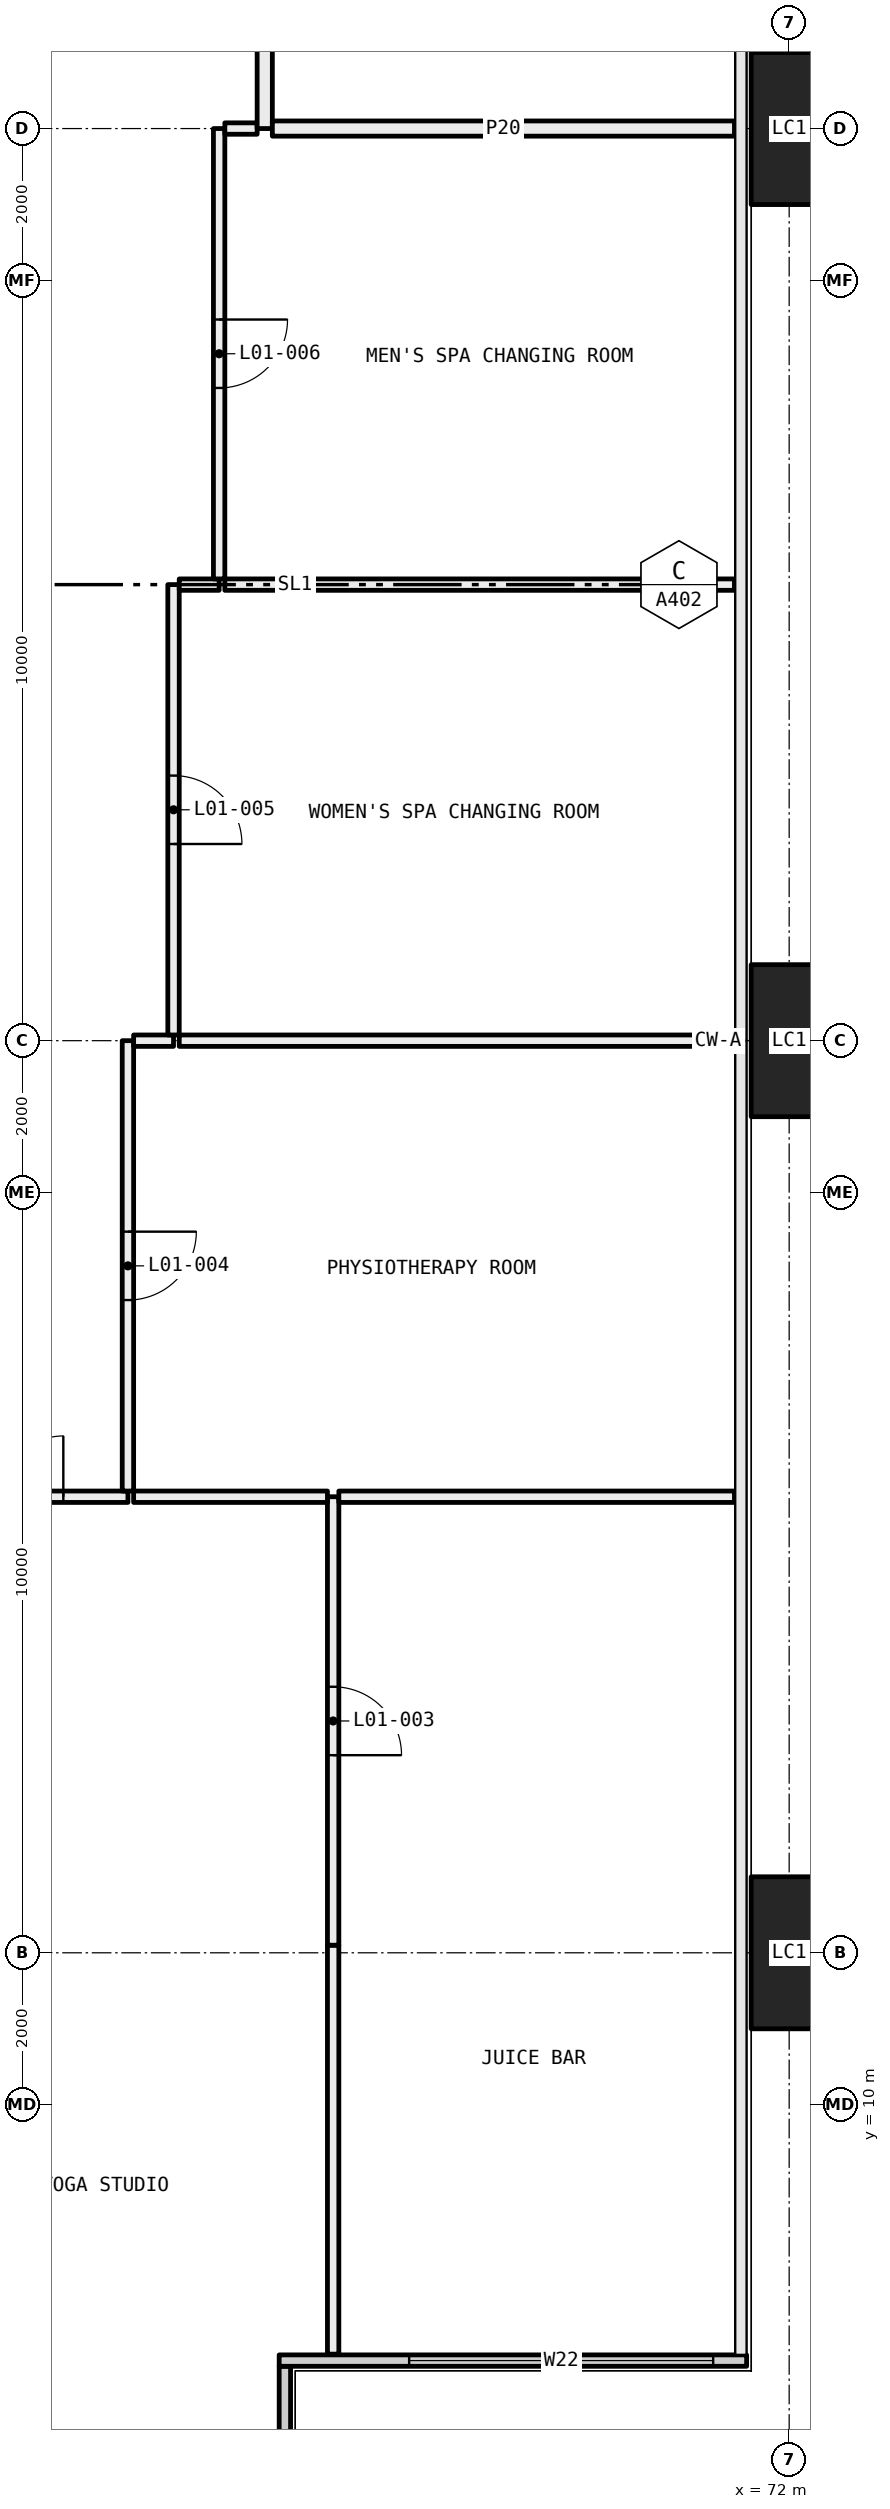
"""IFC4 building model, lengths in metres.
Left out: names, types, materials, properties, quantities, classifications, styles, units other than length and angle.
Written with IfcOpenShell. Run it as: python <this file> out.ifc"""

import sys

from ifc_helpers import new_model, si_unit, direction, frame, frame_2d, origin, origin_2d, place, context, subcontext, project, spatial, rectangle, hollow_rectangle, extrude, element, fill, save


model = new_model("IFC4")
c1 = context("Model", 3, precision=1e-05, world=origin(), true_north=direction((0.0, 1.0)))
c2 = subcontext(c1, "Body", "Model", "MODEL_VIEW")
j1 = project(units=[si_unit("LENGTHUNIT", "METRE"), si_unit("PLANEANGLEUNIT", "RADIAN")], contexts=[c1])
p1 = place(None, origin())
s1 = spatial("IfcSite", under=j1, at=p1, CompositionType="ELEMENT")
p2 = place(p1, origin())
s2 = spatial("IfcBuilding", under=s1, at=p2, CompositionType="ELEMENT")
p3 = place(p2, frame((0.0, 0.0, 6.0)))
s3 = spatial("IfcBuildingStorey", under=s2, at=p3, CompositionType="ELEMENT", Elevation=6.0)
for number, where, z_axis, x_axis in (
    (1, (72.0, 12.0, -0.4), (0.0, 0.0, 1.0), (0.0, 1.0, 0.0)),
    (2, (72.0, 24.0, -0.4), (0.0, 0.0, 1.0), (0.0, 1.0, 0.0)),
    (3, (72.0, 36.0, -0.4), (0.0, 0.0, 1.0), (0.0, 1.0, 0.0)),
):
    element("IfcColumn", number, at=place(p3, frame(where, z_axis=z_axis, x_axis=x_axis)), inside=s3, PredefinedType="COLUMN", context=c2, shape_type="SweptSolid", body=[
        extrude(hollow_rectangle(XDim=2.0, YDim=1.0, WallThickness=0.08, at=origin_2d()), origin(), (0.0, 0.0, 1.0), 6.0),
    ])
p4 = place(p3, frame((65.365, 0.71, 0.0), z_axis=(0.0, 0.0, 1.0), x_axis=(0.0, 1.0, 0.0)))
e4 = element("IfcWall", 4, at=p4, inside=s3, PredefinedType="ELEMENTEDWALL", context=c2, shape_type="SweptSolid", body=[
    extrude(rectangle(XDim=5.85, YDim=0.15, at=frame_2d((2.925, 0.0))), origin(), (0.0, 0.0, 1.0), 5.6),
])
p5 = place(p4, frame((0.29, 0.0, 0.45)))
e5 = element("IfcOpeningElement", 5, at=p5, cuts=e4, PredefinedType="OPENING", context=c2, shape_type="SweptSolid", body=[
    extrude(rectangle(XDim=4.0, YDim=5.1, at=frame_2d((2.0, 2.55))), frame((0.0, 0.085, 0.0), z_axis=(0.0, -1.0, 0.0), x_axis=(1.0, 0.0, 0.0)), (0.0, 0.0, 1.0), 0.17),
])
p6 = place(p3, frame((65.29, 6.635, 0.0), z_axis=(0.0, 0.0, 1.0), x_axis=(1.0, 0.0, 0.0)))
e6 = element("IfcWall", 6, at=p6, inside=s3, PredefinedType="ELEMENTEDWALL", context=c2, shape_type="SweptSolid", body=[
    extrude(rectangle(XDim=6.15, YDim=0.15, at=frame_2d((3.075, 0.0))), origin(), (0.0, 0.0, 1.0), 5.6),
])
p7 = place(p6, frame((1.71, 0.0, 0.45)))
e7 = element("IfcOpeningElement", 7, at=p7, cuts=e6, PredefinedType="OPENING", context=c2, shape_type="SweptSolid", body=[
    extrude(rectangle(XDim=4.0, YDim=5.1, at=frame_2d((2.0, 2.55))), frame((0.0, 0.085, 0.0), z_axis=(0.0, -1.0, 0.0), x_axis=(1.0, 0.0, 0.0)), (0.0, 0.0, 1.0), 0.17),
])
p8 = place(p3, frame((60.0, 18.0, 0.0), z_axis=(0.0, 0.0, 1.0), x_axis=(1.0, 0.0, 0.0)))
e8 = element("IfcWall", 8, at=p8, inside=s3, PredefinedType="PARTITIONING", context=c2, shape_type="SweptSolid", body=[
    extrude(rectangle(XDim=3.3, YDim=0.15, at=frame_2d((1.65, 0.0))), origin(), (0.0, 0.0, 1.0), 5.6),
])
p9 = place(p8, frame((0.85, 0.0, 0.0)))
e9 = element("IfcOpeningElement", 9, at=p9, cuts=e8, PredefinedType="OPENING", context=c2, shape_type="SweptSolid", body=[
    extrude(rectangle(XDim=1.6, YDim=2.1, at=frame_2d((0.8, 1.05))), frame((0.0, 0.085, 0.0), z_axis=(0.0, -1.0, 0.0), x_axis=(1.0, 0.0, 0.0)), (0.0, 0.0, 1.0), 0.17),
])
p10 = place(p3, frame((63.3, 18.075, 0.0), z_axis=(0.0, 0.0, 1.0), x_axis=(0.0, 1.0, 0.0)))
e10 = element("IfcWall", 10, at=p10, inside=s3, PredefinedType="PARTITIONING", context=c2, shape_type="SweptSolid", body=[
    extrude(rectangle(XDim=5.925, YDim=0.15, at=frame_2d((2.962, 0.0))), origin(), (0.0, 0.0, 1.0), 5.0),
])
p11 = place(p10, frame((2.512, 0.0, 0.0)))
e11 = element("IfcOpeningElement", 11, at=p11, cuts=e10, PredefinedType="OPENING", context=c2, shape_type="SweptSolid", body=[
    extrude(rectangle(XDim=0.9, YDim=2.1, at=frame_2d((0.45, 1.05))), frame((0.0, 0.085, 0.0), z_axis=(0.0, -1.0, 0.0), x_axis=(1.0, 0.0, 0.0)), (0.0, 0.0, 1.0), 0.17),
])
p12 = place(p3, frame((63.375, 24.0, 0.0), z_axis=(0.0, 0.0, 1.0), x_axis=(1.0, 0.0, 0.0)))
e12 = element("IfcWall", 12, at=p12, inside=s3, PredefinedType="PARTITIONING", context=c2, shape_type="SweptSolid", body=[
    extrude(rectangle(XDim=0.525, YDim=0.15, at=frame_2d((0.262, 0.0))), origin(), (0.0, 0.0, 1.0), 5.0),
])
p13 = place(p3, frame((63.9, 24.075, 0.0), z_axis=(0.0, 0.0, 1.0), x_axis=(0.0, 1.0, 0.0)))
e13 = element("IfcWall", 13, at=p13, inside=s3, PredefinedType="PARTITIONING", context=c2, shape_type="SweptSolid", body=[
    extrude(rectangle(XDim=5.925, YDim=0.15, at=frame_2d((2.962, 0.0))), origin(), (0.0, 0.0, 1.0), 5.0),
])
p14 = place(p13, frame((2.512, 0.0, 0.0)))
e14 = element("IfcOpeningElement", 14, at=p14, cuts=e13, PredefinedType="OPENING", context=c2, shape_type="SweptSolid", body=[
    extrude(rectangle(XDim=0.9, YDim=2.1, at=frame_2d((0.45, 1.05))), frame((0.0, 0.085, 0.0), z_axis=(0.0, -1.0, 0.0), x_axis=(1.0, 0.0, 0.0)), (0.0, 0.0, 1.0), 0.17),
])
p15 = place(p3, frame((63.975, 30.0, 0.0), z_axis=(0.0, 0.0, 1.0), x_axis=(1.0, 0.0, 0.0)))
e15 = element("IfcWall", 15, at=p15, inside=s3, PredefinedType="PARTITIONING", context=c2, shape_type="SweptSolid", body=[
    extrude(rectangle(XDim=0.525, YDim=0.15, at=frame_2d((0.262, 0.0))), origin(), (0.0, 0.0, 1.0), 5.6),
])
p16 = place(p3, frame((64.5, 30.075, 0.0), z_axis=(0.0, 0.0, 1.0), x_axis=(0.0, 1.0, 0.0)))
e16 = element("IfcWall", 16, at=p16, inside=s3, PredefinedType="PARTITIONING", context=c2, shape_type="SweptSolid", body=[
    extrude(rectangle(XDim=5.925, YDim=0.15, at=frame_2d((2.962, 0.0))), origin(), (0.0, 0.0, 1.0), 5.0),
])
p17 = place(p16, frame((2.512, 0.0, 0.0)))
e17 = element("IfcOpeningElement", 17, at=p17, cuts=e16, PredefinedType="OPENING", context=c2, shape_type="SweptSolid", body=[
    extrude(rectangle(XDim=0.9, YDim=2.1, at=frame_2d((0.45, 1.05))), frame((0.0, 0.085, 0.0), z_axis=(0.0, -1.0, 0.0), x_axis=(1.0, 0.0, 0.0)), (0.0, 0.0, 1.0), 0.17),
])
p18 = place(p3, frame((64.575, 36.0, 0.0), z_axis=(0.0, 0.0, 1.0), x_axis=(1.0, 0.0, 0.0)))
e18 = element("IfcWall", 18, at=p18, inside=s3, PredefinedType="PARTITIONING", context=c2, shape_type="SweptSolid", body=[
    extrude(rectangle(XDim=0.425, YDim=0.15, at=frame_2d((0.212, 0.0))), origin(), (0.0, 0.0, 1.0), 5.0),
])
p19 = place(p3, frame((65.1, 36.0, 0.0), z_axis=(0.0, 0.0, 1.0), x_axis=(0.0, 1.0, 0.0)))
e19 = element("IfcWall", 19, at=p19, inside=s3, PredefinedType="PARTITIONING", context=c2, shape_type="SweptSolid", body=[
    extrude(rectangle(XDim=6.0, YDim=0.2, at=frame_2d((3.0, 0.0))), origin(), (0.0, 0.0, 1.0), 5.0),
])
p20 = place(p19, frame((2.55, 0.0, 0.0)))
e20 = element("IfcOpeningElement", 20, at=p20, cuts=e19, PredefinedType="OPENING", context=c2, shape_type="SweptSolid", body=[
    extrude(rectangle(XDim=0.9, YDim=2.1, at=frame_2d((0.45, 1.05))), frame((0.0, 0.11, 0.0), z_axis=(0.0, -1.0, 0.0), x_axis=(1.0, 0.0, 0.0)), (0.0, 0.0, 1.0), 0.22),
])
p21 = place(p3, frame((66.0, 6.72, 0.0), z_axis=(0.0, 0.0, 1.0), x_axis=(0.0, 1.0, 0.0)))
e21 = element("IfcWall", 21, at=p21, inside=s3, PredefinedType="PARTITIONING", context=c2, shape_type="SweptSolid", body=[
    extrude(rectangle(XDim=5.38, YDim=0.15, at=frame_2d((2.69, 0.0))), origin(), (0.0, 0.0, 1.0), 5.0),
])
p22 = place(p3, frame((66.0, 12.1, 0.0), z_axis=(0.0, 0.0, 1.0), x_axis=(0.0, 1.0, 0.0)))
e22 = element("IfcWall", 22, at=p22, inside=s3, PredefinedType="PARTITIONING", context=c2, shape_type="SweptSolid", body=[
    extrude(rectangle(XDim=5.9, YDim=0.15, at=frame_2d((2.95, 0.0))), origin(), (0.0, 0.0, 1.0), 5.6),
])
p23 = place(p22, frame((2.5, 0.0, 0.0)))
e23 = element("IfcOpeningElement", 23, at=p23, cuts=e22, PredefinedType="OPENING", context=c2, shape_type="SweptSolid", body=[
    extrude(rectangle(XDim=0.9, YDim=2.1, at=frame_2d((0.45, 1.05))), frame((0.0, 0.085, 0.0), z_axis=(0.0, -1.0, 0.0), x_axis=(1.0, 0.0, 0.0)), (0.0, 0.0, 1.0), 0.17),
])
p24 = place(p3, frame((65.925, 18.0, 0.0), z_axis=(0.0, 0.0, 1.0), x_axis=(-1.0, 0.0, 0.0)))
e24 = element("IfcWall", 24, at=p24, inside=s3, PredefinedType="PARTITIONING", context=c2, shape_type="SweptSolid", body=[
    extrude(rectangle(XDim=2.55, YDim=0.15, at=frame_2d((1.275, 0.0))), origin(), (0.0, 0.0, 1.0), 5.6),
])
p25 = place(p3, frame((71.28, 18.0, 0.0), z_axis=(0.0, 0.0, 1.0), x_axis=(-1.0, 0.0, 0.0)))
e25 = element("IfcWall", 25, at=p25, inside=s3, PredefinedType="PARTITIONING", context=c2, shape_type="SweptSolid", body=[
    extrude(rectangle(XDim=5.205, YDim=0.15, at=frame_2d((2.603, 0.0))), origin(), (0.0, 0.0, 1.0), 5.6),
])
p26 = place(p3, frame((71.28, 24.0, 0.0), z_axis=(0.0, 0.0, 1.0), x_axis=(-1.0, 0.0, 0.0)))
e26 = element("IfcWall", 26, at=p26, inside=s3, PredefinedType="PARTITIONING", context=c2, shape_type="SweptSolid", body=[
    extrude(rectangle(XDim=7.305, YDim=0.15, at=frame_2d((3.652, 0.0))), origin(), (0.0, 0.0, 1.0), 5.0),
])
p27 = place(p3, frame((71.28, 30.0, 0.0), z_axis=(0.0, 0.0, 1.0), x_axis=(-1.0, 0.0, 0.0)))
e27 = element("IfcWall", 27, at=p27, inside=s3, PredefinedType="PARTITIONING", context=c2, shape_type="SweptSolid", body=[
    extrude(rectangle(XDim=6.705, YDim=0.15, at=frame_2d((3.353, 0.0))), origin(), (0.0, 0.0, 1.0), 5.6),
])
p28 = place(p3, frame((71.28, 36.0, 0.0), z_axis=(0.0, 0.0, 1.0), x_axis=(-1.0, 0.0, 0.0)))
e28 = element("IfcWall", 28, at=p28, inside=s3, PredefinedType="PARTITIONING", context=c2, shape_type="SweptSolid", body=[
    extrude(rectangle(XDim=6.08, YDim=0.2, at=frame_2d((3.04, 0.0))), origin(), (0.0, 0.0, 1.0), 5.0),
])
p29 = place(p7, origin())
e29 = element("IfcWindow", 29, at=p29, inside=s3, PartitioningType="SINGLE_PANEL", PredefinedType="WINDOW", context=c2, shape_type="SweptSolid", body=[
    extrude(rectangle(XDim=4.0, YDim=5.1, at=frame_2d((2.0, 2.55))), frame((0.0, 0.03, 0.0), z_axis=(0.0, -1.0, 0.0), x_axis=(1.0, 0.0, 0.0)), (0.0, 0.0, 1.0), 0.06),
])
fill(e7, e29)
p30 = place(p9, origin())
e30 = element("IfcDoor", 30, at=p30, inside=s3, OperationType="DOUBLE_DOOR_SINGLE_SWING", PredefinedType="DOOR", context=c2, shape_type="SweptSolid", body=[
    extrude(rectangle(XDim=1.6, YDim=2.1, at=frame_2d((0.8, 1.05))), frame((0.0, 0.025, 0.0), z_axis=(0.0, -1.0, 0.0), x_axis=(1.0, 0.0, 0.0)), (0.0, 0.0, 1.0), 0.05),
])
fill(e9, e30)
p31 = place(p23, frame((0.9, 0.0, 0.0), x_axis=(-1.0, 0.0, 0.0)))
e31 = element("IfcDoor", 31, at=p31, inside=s3, OperationType="SINGLE_SWING_LEFT", PredefinedType="DOOR", context=c2, shape_type="SweptSolid", body=[
    extrude(rectangle(XDim=0.9, YDim=2.1, at=frame_2d((0.45, 1.05))), frame((0.0, 0.025, 0.0), z_axis=(0.0, -1.0, 0.0), x_axis=(1.0, 0.0, 0.0)), (0.0, 0.0, 1.0), 0.05),
])
fill(e23, e31)
p32 = place(p11, frame((0.9, 0.0, 0.0), x_axis=(-1.0, 0.0, 0.0)))
e32 = element("IfcDoor", 32, at=p32, inside=s3, OperationType="SINGLE_SWING_RIGHT", PredefinedType="DOOR", context=c2, shape_type="SweptSolid", body=[
    extrude(rectangle(XDim=0.9, YDim=2.1, at=frame_2d((0.45, 1.05))), frame((0.0, 0.025, 0.0), z_axis=(0.0, -1.0, 0.0), x_axis=(1.0, 0.0, 0.0)), (0.0, 0.0, 1.0), 0.05),
])
fill(e11, e32)
p33 = place(p14, frame((0.9, 0.0, 0.0), x_axis=(-1.0, 0.0, 0.0)))
e33 = element("IfcDoor", 33, at=p33, inside=s3, OperationType="SINGLE_SWING_LEFT", PredefinedType="DOOR", context=c2, shape_type="SweptSolid", body=[
    extrude(rectangle(XDim=0.9, YDim=2.1, at=frame_2d((0.45, 1.05))), frame((0.0, 0.025, 0.0), z_axis=(0.0, -1.0, 0.0), x_axis=(1.0, 0.0, 0.0)), (0.0, 0.0, 1.0), 0.05),
])
fill(e14, e33)
p34 = place(p17, frame((0.9, 0.0, 0.0), x_axis=(-1.0, 0.0, 0.0)))
e34 = element("IfcDoor", 34, at=p34, inside=s3, OperationType="SINGLE_SWING_RIGHT", PredefinedType="DOOR", context=c2, shape_type="SweptSolid", body=[
    extrude(rectangle(XDim=0.9, YDim=2.1, at=frame_2d((0.45, 1.05))), frame((0.0, 0.025, 0.0), z_axis=(0.0, -1.0, 0.0), x_axis=(1.0, 0.0, 0.0)), (0.0, 0.0, 1.0), 0.05),
])
fill(e17, e34)
save(model, sys.argv[1])
